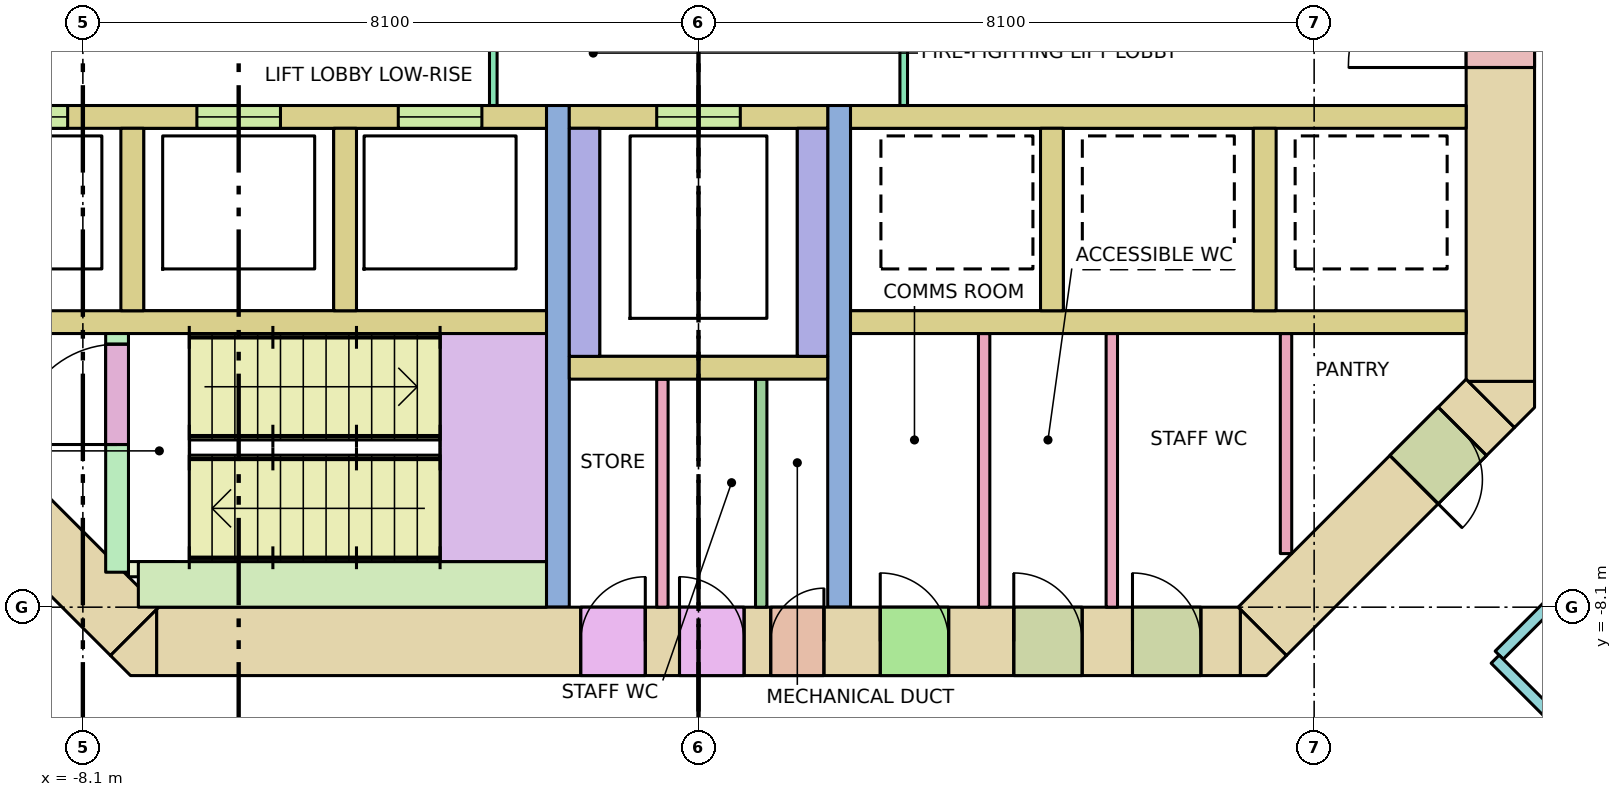
"""IFC4 building model, lengths in metres.
Left out: names, types, materials, properties, quantities, classifications, styles, units other than length and angle.
Written with IfcOpenShell. Run it as: python <this file> out.ifc"""

import sys

from ifc_helpers import new_model, si_unit, direction, frame, frame_2d, origin, place, context, subcontext, project, spatial, polyline, rectangle, outline, extrude, element, fill, save


model = new_model("IFC4")
c1 = context("Model", 3, precision=1e-05, world=origin(), true_north=direction((0.0, 1.0)))
c2 = subcontext(c1, "Body", "Model", "MODEL_VIEW")
j1 = project(units=[si_unit("LENGTHUNIT", "METRE"), si_unit("PLANEANGLEUNIT", "RADIAN")], contexts=[c1])
p1 = place(None, origin())
s1 = spatial("IfcSite", under=j1, at=p1, CompositionType="ELEMENT")
p2 = place(p1, origin())
s2 = spatial("IfcBuilding", under=s1, at=p2, CompositionType="ELEMENT")
p3 = place(p2, frame((0.0, 0.0, 51.0)))
s3 = spatial("IfcBuildingStorey", under=s2, at=p3, CompositionType="ELEMENT", Elevation=51.0)
p4 = place(p3, frame((-7.13, -8.55, -0.28), z_axis=(0.0, 0.0, 1.0), x_axis=(1.0, 0.0, 0.0)))
e1 = element("IfcWall", 1, at=p4, inside=s3, PredefinedType="SHEAR", context=c2, shape_type="SweptSolid", body=[
    extrude(rectangle(XDim=14.26, YDim=0.9, at=frame_2d((7.13, 0.0))), origin(), (0.0, 0.0, 1.0), 4.0),
])
p5 = place(p4, frame((8.08, 0.0, 0.28)))
e2 = element("IfcOpeningElement", 2, at=p5, cuts=e1, PredefinedType="OPENING", context=c2, shape_type="SweptSolid", body=[
    extrude(rectangle(XDim=0.7, YDim=2.1, at=frame_2d((0.35, 1.05))), frame((0.0, 0.46, 0.0), z_axis=(0.0, -1.0, 0.0), x_axis=(1.0, 0.0, 0.0)), (0.0, 0.0, 1.0), 0.92),
])
p6 = place(p4, frame((5.58, 0.0, 0.28)))
e3 = element("IfcOpeningElement", 3, at=p6, cuts=e1, PredefinedType="OPENING", context=c2, shape_type="SweptSolid", body=[
    extrude(rectangle(XDim=0.85, YDim=2.1, at=frame_2d((0.425, 1.05))), frame((0.0, 0.46, 0.0), z_axis=(0.0, -1.0, 0.0), x_axis=(1.0, 0.0, 0.0)), (0.0, 0.0, 1.0), 0.92),
])
p7 = place(p4, frame((6.88, 0.0, 0.28)))
e4 = element("IfcOpeningElement", 4, at=p7, cuts=e1, PredefinedType="OPENING", context=c2, shape_type="SweptSolid", body=[
    extrude(rectangle(XDim=0.85, YDim=2.1, at=frame_2d((0.425, 1.05))), frame((0.0, 0.46, 0.0), z_axis=(0.0, -1.0, 0.0), x_axis=(1.0, 0.0, 0.0)), (0.0, 0.0, 1.0), 0.92),
])
p8 = place(p4, frame((9.521, 0.0, 0.28)))
e5 = element("IfcOpeningElement", 5, at=p8, cuts=e1, PredefinedType="OPENING", context=c2, shape_type="SweptSolid", body=[
    extrude(rectangle(XDim=0.9, YDim=2.1, at=frame_2d((0.45, 1.05))), frame((0.0, 0.46, 0.0), z_axis=(0.0, -1.0, 0.0), x_axis=(1.0, 0.0, 0.0)), (0.0, 0.0, 1.0), 0.92),
])
p9 = place(p4, frame((11.278, 0.0, 0.28)))
e6 = element("IfcOpeningElement", 6, at=p9, cuts=e1, PredefinedType="OPENING", context=c2, shape_type="SweptSolid", body=[
    extrude(rectangle(XDim=0.9, YDim=2.1, at=frame_2d((0.45, 1.05))), frame((0.0, 0.46, 0.0), z_axis=(0.0, -1.0, 0.0), x_axis=(1.0, 0.0, 0.0)), (0.0, 0.0, 1.0), 0.92),
])
p10 = place(p4, frame((12.84, 0.0, 0.28)))
e7 = element("IfcOpeningElement", 7, at=p10, cuts=e1, PredefinedType="OPENING", context=c2, shape_type="SweptSolid", body=[
    extrude(rectangle(XDim=0.9, YDim=2.1, at=frame_2d((0.45, 1.05))), frame((0.0, 0.46, 0.0), z_axis=(0.0, -1.0, 0.0), x_axis=(1.0, 0.0, 0.0)), (0.0, 0.0, 1.0), 0.92),
])
p11 = place(p3, frame((10.55, -5.13, -0.28), z_axis=(0.0, 0.0, 1.0), x_axis=(0.0, 1.0, 0.0)))
e8 = element("IfcWall", 8, at=p11, inside=s3, PredefinedType="SHEAR", context=c2, shape_type="SweptSolid", body=[
    extrude(rectangle(XDim=10.26, YDim=0.9, at=frame_2d((5.13, 0.0))), origin(), (0.0, 0.0, 1.0), 4.0),
])
p12 = place(p11, frame((4.13, 0.0, 0.28)))
e9 = element("IfcOpeningElement", 9, at=p12, cuts=e8, PredefinedType="OPENING", context=c2, shape_type="SweptSolid", body=[
    extrude(rectangle(XDim=2.0, YDim=2.1, at=frame_2d((1.0, 1.05))), frame((0.0, 0.46, 0.0), z_axis=(0.0, -1.0, 0.0), x_axis=(1.0, 0.0, 0.0)), (0.0, 0.0, 1.0), 0.92),
])
p13 = place(p3, frame((10.418, -5.418, -0.28), z_axis=(0.0, 0.0, 1.0), x_axis=(-0.707106781187, -0.707106781187, 0.0)))
e10 = element("IfcWall", 10, at=p13, inside=s3, PredefinedType="SHEAR", context=c2, shape_type="SweptSolid", body=[
    extrude(rectangle(XDim=4.243, YDim=0.9, at=frame_2d((2.121, 0.0))), origin(), (0.0, 0.0, 1.0), 4.0),
])
p14 = place(p13, frame((0.52, 0.0, 0.28)))
e11 = element("IfcOpeningElement", 11, at=p14, cuts=e10, PredefinedType="OPENING", context=c2, shape_type="SweptSolid", body=[
    extrude(rectangle(XDim=0.9, YDim=2.1, at=frame_2d((0.45, 1.05))), frame((0.0, 0.46, 0.0), z_axis=(0.0, -1.0, 0.0), x_axis=(1.0, 0.0, 0.0)), (0.0, 0.0, 1.0), 0.92),
])
p15 = place(p3, frame((-7.418, -8.418, -0.28), z_axis=(0.0, 0.0, 1.0), x_axis=(-0.707106781187, 0.707106781187, 0.0)))
e12 = element("IfcWall", 12, at=p15, inside=s3, PredefinedType="SHEAR", context=c2, shape_type="SweptSolid", body=[
    extrude(rectangle(XDim=4.243, YDim=0.9, at=frame_2d((2.121, 0.0))), origin(), (0.0, 0.0, 1.0), 4.0),
])
p16 = place(p15, frame((2.393, 0.0, 0.28)))
e13 = element("IfcOpeningElement", 13, at=p16, cuts=e12, PredefinedType="OPENING", context=c2, shape_type="SweptSolid", body=[
    extrude(rectangle(XDim=1.2, YDim=2.1, at=frame_2d((0.6, 1.05))), frame((0.0, 0.46, 0.0), z_axis=(0.0, -1.0, 0.0), x_axis=(1.0, 0.0, 0.0)), (0.0, 0.0, 1.0), 0.92),
])
p17 = place(p3, frame((0.0, 0.0, -0.28)))
e14 = element("IfcWall", 14, at=p17, inside=s3, PredefinedType="SHEAR", context=c2, shape_type="SweptSolid", body=[
    extrude(outline(polyline([(-7.473, -9.0), (-7.736, -8.736), (-7.13, -8.13), (-7.13, -9.0), (-7.473, -9.0)])), origin(), (0.0, 0.0, 1.0), 4.0),
])
p18 = place(p3, frame((0.0, 0.0, -0.28)))
e15 = element("IfcWall", 15, at=p18, inside=s3, PredefinedType="SHEAR", context=c2, shape_type="SweptSolid", body=[
    extrude(outline(polyline([(7.473, -9.0), (7.13, -9.0), (7.13, -8.13), (7.736, -8.736), (7.473, -9.0)])), origin(), (0.0, 0.0, 1.0), 4.0),
])
p19 = place(p3, frame((0.0, 0.0, -0.28)))
e16 = element("IfcWall", 16, at=p19, inside=s3, PredefinedType="SHEAR", context=c2, shape_type="SweptSolid", body=[
    extrude(outline(polyline([(11.0, -5.473), (10.736, -5.736), (10.13, -5.13), (11.0, -5.13), (11.0, -5.473)])), origin(), (0.0, 0.0, 1.0), 4.0),
])
for number, where, z_axis, x_axis in (
    (17, (-10.1, -4.35, 0.0), (0.0, 0.0, 1.0), (1.0, 0.0, 0.0)),
    (18, (2.0, -4.35, 0.0), (0.0, 0.0, 1.0), (1.0, 0.0, 0.0)),
):
    element("IfcWall", number, at=place(p3, frame(where, z_axis=z_axis, x_axis=x_axis)), inside=s3, PredefinedType="SOLIDWALL", context=c2, shape_type="SweptSolid", body=[
        extrude(rectangle(XDim=8.1, YDim=0.3, at=frame_2d((4.05, 0.0))), origin(), (0.0, 0.0, 1.0), 3.72),
    ])
p20 = place(p3, frame((-10.1, -1.65, 0.0), z_axis=(0.0, 0.0, 1.0), x_axis=(1.0, 0.0, 0.0)))
e19 = element("IfcWall", 19, at=p20, inside=s3, PredefinedType="SOLIDWALL", context=c2, shape_type="SweptSolid", body=[
    extrude(rectangle(XDim=8.1, YDim=0.3, at=frame_2d((4.05, 0.0))), origin(), (0.0, 0.0, 1.0), 3.72),
])
p21 = place(p20, frame((0.7, 0.0, 0.0)))
e20 = element("IfcOpeningElement", 20, at=p21, cuts=e19, PredefinedType="OPENING", context=c2, shape_type="SweptSolid", body=[
    extrude(rectangle(XDim=1.1, YDim=2.1, at=frame_2d((0.55, 1.05))), frame((0.0, 0.16, 0.0), z_axis=(0.0, -1.0, 0.0), x_axis=(1.0, 0.0, 0.0)), (0.0, 0.0, 1.0), 0.32),
])
p22 = place(p20, frame((3.5, 0.0, 0.0)))
e21 = element("IfcOpeningElement", 21, at=p22, cuts=e19, PredefinedType="OPENING", context=c2, shape_type="SweptSolid", body=[
    extrude(rectangle(XDim=1.1, YDim=2.1, at=frame_2d((0.55, 1.05))), frame((0.0, 0.16, 0.0), z_axis=(0.0, -1.0, 0.0), x_axis=(1.0, 0.0, 0.0)), (0.0, 0.0, 1.0), 0.32),
])
p23 = place(p20, frame((6.15, 0.0, 0.0)))
e22 = element("IfcOpeningElement", 22, at=p23, cuts=e19, PredefinedType="OPENING", context=c2, shape_type="SweptSolid", body=[
    extrude(rectangle(XDim=1.1, YDim=2.1, at=frame_2d((0.55, 1.05))), frame((0.0, 0.16, 0.0), z_axis=(0.0, -1.0, 0.0), x_axis=(1.0, 0.0, 0.0)), (0.0, 0.0, 1.0), 0.32),
])
p24 = place(p3, frame((2.0, -1.65, 0.0), z_axis=(0.0, 0.0, 1.0), x_axis=(1.0, 0.0, 0.0)))
e23 = element("IfcWall", 23, at=p24, inside=s3, PredefinedType="SOLIDWALL", context=c2, shape_type="SweptSolid", body=[
    extrude(rectangle(XDim=8.1, YDim=0.3, at=frame_2d((4.05, 0.0))), origin(), (0.0, 0.0, 1.0), 3.72),
])
for number, where, z_axis, x_axis in (
    (24, (-7.45, -4.2, 0.0), (0.0, 0.0, 1.0), (0.0, 1.0, 0.0)),
    (25, (-4.65, -4.2, 0.0), (0.0, 0.0, 1.0), (0.0, 1.0, 0.0)),
    (26, (4.65, -4.2, 0.0), (0.0, 0.0, 1.0), (0.0, 1.0, 0.0)),
    (27, (7.45, -4.2, 0.0), (0.0, 0.0, 1.0), (0.0, 1.0, 0.0)),
):
    element("IfcWall", number, at=place(p3, frame(where, z_axis=z_axis, x_axis=x_axis)), inside=s3, PredefinedType="SOLIDWALL", context=c2, shape_type="SweptSolid", body=[
        extrude(rectangle(XDim=2.4, YDim=0.3, at=frame_2d((1.2, 0.0))), origin(), (0.0, 0.0, 1.0), 3.72),
    ])
for number, where, z_axis, x_axis in (
    (28, (-1.85, -8.1, 0.0), (0.0, 0.0, 1.0), (0.0, 1.0, 0.0)),
    (29, (1.85, -8.1, 0.0), (0.0, 0.0, 1.0), (0.0, 1.0, 0.0)),
):
    element("IfcWall", number, at=place(p3, frame(where, z_axis=z_axis, x_axis=x_axis)), inside=s3, PredefinedType="SHEAR", context=c2, shape_type="SweptSolid", body=[
        extrude(rectangle(XDim=6.6, YDim=0.3, at=frame_2d((3.3, 0.0))), origin(), (0.0, 0.0, 1.0), 3.72),
    ])
p25 = place(p3, frame((-1.7, -1.65, 0.0), z_axis=(0.0, 0.0, 1.0), x_axis=(1.0, 0.0, 0.0)))
e30 = element("IfcWall", 30, at=p25, inside=s3, PredefinedType="SOLIDWALL", context=c2, shape_type="SweptSolid", body=[
    extrude(rectangle(XDim=3.4, YDim=0.3, at=frame_2d((1.7, 0.0))), origin(), (0.0, 0.0, 1.0), 3.72),
])
p26 = place(p25, frame((1.15, 0.0, 0.0)))
e31 = element("IfcOpeningElement", 31, at=p26, cuts=e30, PredefinedType="OPENING", context=c2, shape_type="SweptSolid", body=[
    extrude(rectangle(XDim=1.1, YDim=2.1, at=frame_2d((0.55, 1.05))), frame((0.0, 0.16, 0.0), z_axis=(0.0, -1.0, 0.0), x_axis=(1.0, 0.0, 0.0)), (0.0, 0.0, 1.0), 0.32),
])
for number, where, z_axis, x_axis in (
    (32, (-1.5, -4.8, 0.0), (0.0, 0.0, 1.0), (0.0, 1.0, 0.0)),
    (33, (1.5, -4.8, 0.0), (0.0, 0.0, 1.0), (0.0, 1.0, 0.0)),
):
    element("IfcWall", number, at=place(p3, frame(where, z_axis=z_axis, x_axis=x_axis)), inside=s3, PredefinedType="SOLIDWALL", context=c2, shape_type="SweptSolid", body=[
        extrude(rectangle(XDim=3.0, YDim=0.4, at=frame_2d((1.5, 0.0))), origin(), (0.0, 0.0, 1.0), 3.72),
    ])
p27 = place(p3, frame((-1.7, -4.95, 0.0), z_axis=(0.0, 0.0, 1.0), x_axis=(1.0, 0.0, 0.0)))
e34 = element("IfcWall", 34, at=p27, inside=s3, PredefinedType="SOLIDWALL", context=c2, shape_type="SweptSolid", body=[
    extrude(rectangle(XDim=3.4, YDim=0.3, at=frame_2d((1.7, 0.0))), origin(), (0.0, 0.0, 1.0), 3.72),
])
p28 = place(p3, frame((-7.65, -7.64, 0.0), z_axis=(0.0, 0.0, 1.0), x_axis=(0.0, 1.0, 0.0)))
e35 = element("IfcWall", 35, at=p28, inside=s3, PredefinedType="SHEAR", context=c2, shape_type="SweptSolid", body=[
    extrude(rectangle(XDim=3.14, YDim=0.3, at=frame_2d((1.57, 0.0))), origin(), (0.0, 0.0, 1.0), 3.72),
])
p29 = place(p28, frame((1.68, 0.0, 0.0)))
e36 = element("IfcOpeningElement", 36, at=p29, cuts=e35, PredefinedType="OPENING", context=c2, shape_type="SweptSolid", body=[
    extrude(rectangle(XDim=1.32, YDim=2.1, at=frame_2d((0.66, 1.05))), frame((0.0, 0.16, 0.0), z_axis=(0.0, -1.0, 0.0), x_axis=(1.0, 0.0, 0.0)), (0.0, 0.0, 1.0), 0.32),
])
p30 = place(p3, frame((-7.5, -7.6, 0.0), z_axis=(0.0, 0.0, 1.0), x_axis=(1.0, 0.0, 0.0)))
e37 = element("IfcWall", 37, at=p30, inside=s3, PredefinedType="SHEAR", context=c2, shape_type="SweptSolid", body=[
    extrude(rectangle(XDim=0.6, YDim=0.2, at=frame_2d((0.3, 0.0))), origin(), (0.0, 0.0, 1.0), 3.72),
])
p31 = place(p3, frame((-7.37, -7.8, 0.0), z_axis=(0.0, 0.0, 1.0), x_axis=(1.0, 0.0, 0.0)))
e38 = element("IfcWall", 38, at=p31, inside=s3, PredefinedType="SHEAR", context=c2, shape_type="SweptSolid", body=[
    extrude(rectangle(XDim=5.37, YDim=0.6, at=frame_2d((2.685, 0.0))), origin(), (0.0, 0.0, 1.0), 3.72),
])
p32 = place(p3, frame((-2.7, -1.5, 0.0), z_axis=(0.0, 0.0, 1.0), x_axis=(0.0, 1.0, 0.0)))
e39 = element("IfcWall", 39, at=p32, inside=s3, PredefinedType="PARTITIONING", context=c2, shape_type="SweptSolid", body=[
    extrude(rectangle(XDim=3.0, YDim=0.1, at=frame_2d((1.5, 0.0))), origin(), (0.0, 0.0, 1.0), 3.72),
])
p33 = place(p32, frame((0.9, 0.0, 0.0)))
e40 = element("IfcOpeningElement", 40, at=p33, cuts=e39, PredefinedType="OPENING", context=c2, shape_type="SweptSolid", body=[
    extrude(rectangle(XDim=1.2, YDim=2.1, at=frame_2d((0.6, 1.05))), frame((0.0, 0.06, 0.0), z_axis=(0.0, -1.0, 0.0), x_axis=(1.0, 0.0, 0.0)), (0.0, 0.0, 1.0), 0.12),
])
p34 = place(p3, frame((2.7, -1.5, 0.0), z_axis=(0.0, 0.0, 1.0), x_axis=(0.0, 1.0, 0.0)))
e41 = element("IfcWall", 41, at=p34, inside=s3, PredefinedType="PARTITIONING", context=c2, shape_type="SweptSolid", body=[
    extrude(rectangle(XDim=3.0, YDim=0.1, at=frame_2d((1.5, 0.0))), origin(), (0.0, 0.0, 1.0), 3.72),
])
p35 = place(p34, frame((0.9, 0.0, 0.0)))
e42 = element("IfcOpeningElement", 42, at=p35, cuts=e41, PredefinedType="OPENING", context=c2, shape_type="SweptSolid", body=[
    extrude(rectangle(XDim=1.2, YDim=2.1, at=frame_2d((0.6, 1.05))), frame((0.0, 0.06, 0.0), z_axis=(0.0, -1.0, 0.0), x_axis=(1.0, 0.0, 0.0)), (0.0, 0.0, 1.0), 0.12),
])
for number, where, z_axis, x_axis in (
    (43, (0.825, -8.1, 0.0), (0.0, 0.0, 1.0), (0.0, 1.0, 0.0)),
    (44, (-0.475, -8.1, 0.0), (0.0, 0.0, 1.0), (0.0, 1.0, 0.0)),
):
    element("IfcWall", number, at=place(p3, frame(where, z_axis=z_axis, x_axis=x_axis)), inside=s3, PredefinedType="PARTITIONING", context=c2, shape_type="SweptSolid", body=[
        extrude(rectangle(XDim=3.0, YDim=0.15, at=frame_2d((1.5, 0.0))), origin(), (0.0, 0.0, 1.0), 3.72),
    ])
for number, where, z_axis, x_axis in (
    (45, (3.758, -8.1, 0.0), (0.0, 0.0, 1.0), (0.0, 1.0, 0.0)),
    (46, (5.438, -8.1, 0.0), (0.0, 0.0, 1.0), (0.0, 1.0, 0.0)),
):
    element("IfcWall", number, at=place(p3, frame(where, z_axis=z_axis, x_axis=x_axis)), inside=s3, PredefinedType="PARTITIONING", context=c2, shape_type="SweptSolid", body=[
        extrude(rectangle(XDim=3.6, YDim=0.15, at=frame_2d((1.8, 0.0))), origin(), (0.0, 0.0, 1.0), 3.72),
    ])
p36 = place(p3, frame((7.73, -7.395, 0.0), z_axis=(0.0, 0.0, 1.0), x_axis=(0.0, 1.0, 0.0)))
e47 = element("IfcWall", 47, at=p36, inside=s3, PredefinedType="PARTITIONING", context=c2, shape_type="SweptSolid", body=[
    extrude(rectangle(XDim=2.895, YDim=0.15, at=frame_2d((1.448, 0.0))), origin(), (0.0, 0.0, 1.0), 3.72),
])
p37 = place(p3, frame((-8.328, -10.938, 0.0), z_axis=(0.0, 0.0, 1.0), x_axis=(-0.707125355289, 0.707088206597, 0.0)))
e48 = element("IfcWall", 48, at=p37, inside=s3, PredefinedType="PARTITIONING", context=c2, shape_type="SweptSolid", body=[
    extrude(rectangle(XDim=6.572, YDim=0.15, at=frame_2d((3.286, 0.0))), origin(), (0.0, 0.0, 1.0), 2.82),
])
p38 = place(p37, frame((2.386, 0.0, 0.0)))
e49 = element("IfcOpeningElement", 49, at=p38, cuts=e48, PredefinedType="OPENING", context=c2, shape_type="SweptSolid", body=[
    extrude(rectangle(XDim=1.8, YDim=2.1, at=frame_2d((0.9, 1.05))), frame((0.0, 0.085, 0.0), z_axis=(0.0, -1.0, 0.0), x_axis=(1.0, 0.0, 0.0)), (0.0, 0.0, 1.0), 0.17),
])
p39 = place(p3, frame((12.938, -6.328, 0.0), z_axis=(0.0, 0.0, 1.0), x_axis=(-0.707106781187, -0.707106781187, 0.0)))
e50 = element("IfcWall", 50, at=p39, inside=s3, PredefinedType="PARTITIONING", context=c2, shape_type="SweptSolid", body=[
    extrude(rectangle(XDim=3.399, YDim=0.15, at=frame_2d((1.7, 0.0))), origin(), (0.0, 0.0, 1.0), 2.82),
])
p40 = place(p3, frame((10.481, -8.784, 0.0), z_axis=(0.0, 0.0, 1.0), x_axis=(0.707124155885, -0.707089406061, 0.0)))
e51 = element("IfcWall", 51, at=p40, inside=s3, PredefinedType="PARTITIONING", context=c2, shape_type="SweptSolid", body=[
    extrude(rectangle(XDim=7.026, YDim=0.15, at=frame_2d((3.513, 0.0))), origin(), (0.0, 0.0, 1.0), 3.72),
])
p41 = place(p40, frame((3.063, 0.0, 0.0)))
e52 = element("IfcOpeningElement", 52, at=p41, cuts=e51, PredefinedType="OPENING", context=c2, shape_type="SweptSolid", body=[
    extrude(rectangle(XDim=0.9, YDim=2.1, at=frame_2d((0.45, 1.05))), frame((0.0, 0.085, 0.0), z_axis=(0.0, -1.0, 0.0), x_axis=(1.0, 0.0, 0.0)), (0.0, 0.0, 1.0), 0.17),
])
p42 = place(p21, origin())
e53 = element("IfcDoor", 53, at=p42, inside=s3, OperationType="DOUBLE_DOOR_SLIDING", PredefinedType="DOOR", context=c2, shape_type="SweptSolid", body=[
    extrude(rectangle(XDim=1.1, YDim=2.1, at=frame_2d((0.55, 1.05))), frame((0.0, 0.025, 0.0), z_axis=(0.0, -1.0, 0.0), x_axis=(1.0, 0.0, 0.0)), (0.0, 0.0, 1.0), 0.05),
])
fill(e20, e53)
p43 = place(p22, origin())
e54 = element("IfcDoor", 54, at=p43, inside=s3, OperationType="DOUBLE_DOOR_SLIDING", PredefinedType="DOOR", context=c2, shape_type="SweptSolid", body=[
    extrude(rectangle(XDim=1.1, YDim=2.1, at=frame_2d((0.55, 1.05))), frame((0.0, 0.025, 0.0), z_axis=(0.0, -1.0, 0.0), x_axis=(1.0, 0.0, 0.0)), (0.0, 0.0, 1.0), 0.05),
])
fill(e21, e54)
p44 = place(p23, origin())
e55 = element("IfcDoor", 55, at=p44, inside=s3, OperationType="DOUBLE_DOOR_SLIDING", PredefinedType="DOOR", context=c2, shape_type="SweptSolid", body=[
    extrude(rectangle(XDim=1.1, YDim=2.1, at=frame_2d((0.55, 1.05))), frame((0.0, 0.025, 0.0), z_axis=(0.0, -1.0, 0.0), x_axis=(1.0, 0.0, 0.0)), (0.0, 0.0, 1.0), 0.05),
])
fill(e22, e55)
p45 = place(p26, origin())
e56 = element("IfcDoor", 56, at=p45, inside=s3, OperationType="DOUBLE_DOOR_SLIDING", PredefinedType="DOOR", context=c2, shape_type="SweptSolid", body=[
    extrude(rectangle(XDim=1.1, YDim=2.1, at=frame_2d((0.55, 1.05))), frame((0.0, 0.025, 0.0), z_axis=(0.0, -1.0, 0.0), x_axis=(1.0, 0.0, 0.0)), (0.0, 0.0, 1.0), 0.05),
])
fill(e31, e56)
p46 = place(p29, origin())
e57 = element("IfcDoor", 57, at=p46, inside=s3, OperationType="DOUBLE_DOOR_SINGLE_SWING", PredefinedType="DOOR", context=c2, shape_type="SweptSolid", body=[
    extrude(rectangle(XDim=1.32, YDim=2.1, at=frame_2d((0.66, 1.05))), frame((0.0, 0.025, 0.0), z_axis=(0.0, -1.0, 0.0), x_axis=(1.0, 0.0, 0.0)), (0.0, 0.0, 1.0), 0.05),
])
fill(e36, e57)
p47 = place(p12, origin())
e58 = element("IfcDoor", 58, at=p47, inside=s3, OperationType="DOUBLE_DOOR_SINGLE_SWING", PredefinedType="DOOR", context=c2, shape_type="SweptSolid", body=[
    extrude(rectangle(XDim=2.0, YDim=2.1, at=frame_2d((1.0, 1.05))), frame((0.0, 0.025, 0.0), z_axis=(0.0, -1.0, 0.0), x_axis=(1.0, 0.0, 0.0)), (0.0, 0.0, 1.0), 0.05),
])
fill(e9, e58)
p48 = place(p5, origin())
e59 = element("IfcDoor", 59, at=p48, inside=s3, OperationType="SINGLE_SWING_RIGHT", PredefinedType="DOOR", context=c2, shape_type="SweptSolid", body=[
    extrude(rectangle(XDim=0.7, YDim=2.1, at=frame_2d((0.35, 1.05))), frame((0.0, 0.025, 0.0), z_axis=(0.0, -1.0, 0.0), x_axis=(1.0, 0.0, 0.0)), (0.0, 0.0, 1.0), 0.05),
])
fill(e2, e59)
p49 = place(p6, origin())
e60 = element("IfcDoor", 60, at=p49, inside=s3, OperationType="SINGLE_SWING_RIGHT", PredefinedType="DOOR", context=c2, shape_type="SweptSolid", body=[
    extrude(rectangle(XDim=0.85, YDim=2.1, at=frame_2d((0.425, 1.05))), frame((0.0, 0.025, 0.0), z_axis=(0.0, -1.0, 0.0), x_axis=(1.0, 0.0, 0.0)), (0.0, 0.0, 1.0), 0.05),
])
fill(e3, e60)
p50 = place(p7, origin())
e61 = element("IfcDoor", 61, at=p50, inside=s3, OperationType="SINGLE_SWING_LEFT", PredefinedType="DOOR", context=c2, shape_type="SweptSolid", body=[
    extrude(rectangle(XDim=0.85, YDim=2.1, at=frame_2d((0.425, 1.05))), frame((0.0, 0.025, 0.0), z_axis=(0.0, -1.0, 0.0), x_axis=(1.0, 0.0, 0.0)), (0.0, 0.0, 1.0), 0.05),
])
fill(e4, e61)
p51 = place(p8, origin())
e62 = element("IfcDoor", 62, at=p51, inside=s3, OperationType="SINGLE_SWING_LEFT", PredefinedType="DOOR", context=c2, shape_type="SweptSolid", body=[
    extrude(rectangle(XDim=0.9, YDim=2.1, at=frame_2d((0.45, 1.05))), frame((0.0, 0.025, 0.0), z_axis=(0.0, -1.0, 0.0), x_axis=(1.0, 0.0, 0.0)), (0.0, 0.0, 1.0), 0.05),
])
fill(e5, e62)
p52 = place(p9, origin())
e63 = element("IfcDoor", 63, at=p52, inside=s3, OperationType="SINGLE_SWING_LEFT", PredefinedType="DOOR", context=c2, shape_type="SweptSolid", body=[
    extrude(rectangle(XDim=0.9, YDim=2.1, at=frame_2d((0.45, 1.05))), frame((0.0, 0.025, 0.0), z_axis=(0.0, -1.0, 0.0), x_axis=(1.0, 0.0, 0.0)), (0.0, 0.0, 1.0), 0.05),
])
fill(e6, e63)
p53 = place(p10, origin())
e64 = element("IfcDoor", 64, at=p53, inside=s3, OperationType="SINGLE_SWING_LEFT", PredefinedType="DOOR", context=c2, shape_type="SweptSolid", body=[
    extrude(rectangle(XDim=0.9, YDim=2.1, at=frame_2d((0.45, 1.05))), frame((0.0, 0.025, 0.0), z_axis=(0.0, -1.0, 0.0), x_axis=(1.0, 0.0, 0.0)), (0.0, 0.0, 1.0), 0.05),
])
fill(e7, e64)
p54 = place(p14, origin())
e65 = element("IfcDoor", 65, at=p54, inside=s3, OperationType="SINGLE_SWING_RIGHT", PredefinedType="DOOR", context=c2, shape_type="SweptSolid", body=[
    extrude(rectangle(XDim=0.9, YDim=2.1, at=frame_2d((0.45, 1.05))), frame((0.0, 0.025, 0.0), z_axis=(0.0, -1.0, 0.0), x_axis=(1.0, 0.0, 0.0)), (0.0, 0.0, 1.0), 0.05),
])
fill(e11, e65)
save(model, sys.argv[1])
